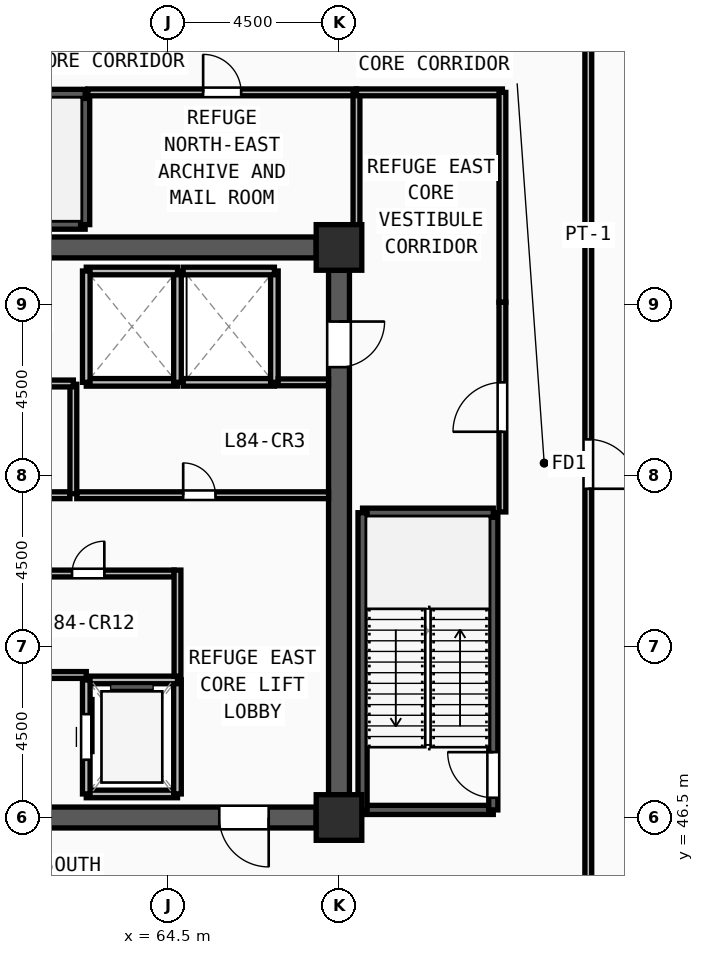
"""IFC4 building model, lengths in metres.
Left out: names, types, materials, properties, quantities, classifications, styles, units other than length and angle.
Written with IfcOpenShell. Run it as: python <this file> out.ifc"""

import sys

from ifc_helpers import new_model, si_unit, direction, frame, frame_2d, origin, origin_2d, place, context, subcontext, project, spatial, rectangle, extrude, source, transform, mapped, element, fill, save


model = new_model("IFC4")
c1 = context("Model", 3, precision=1e-05, world=origin(), true_north=direction((0.0, 1.0)))
c2 = subcontext(c1, "Body", "Model", "MODEL_VIEW")
j1 = project(units=[si_unit("LENGTHUNIT", "METRE"), si_unit("PLANEANGLEUNIT", "RADIAN")], contexts=[c1])
p1 = place(None, origin())
s1 = spatial("IfcSite", under=j1, at=p1, CompositionType="ELEMENT")
p2 = place(p1, origin())
s2 = spatial("IfcBuilding", under=s1, at=p2, CompositionType="ELEMENT")
p3 = place(p2, frame((0.0, 0.0, 324.0)))
s3 = spatial("IfcBuildingStorey", under=s2, at=p3, CompositionType="ELEMENT", Elevation=324.0)
m1 = source(origin(), c2, "Body", "SweptSolid", [
    extrude(rectangle(XDim=1.2, YDim=1.2, at=origin_2d()), origin(), (0.0, 0.0, 1.0), 4.5),
])
for number, where, z_axis, x_axis in (
    (1, (69.0, 46.5, 0.0), (0.0, 0.0, 1.0), (1.0, 0.0, 0.0)),
    (2, (69.0, 61.5, 0.0), (0.0, 0.0, 1.0), (1.0, 0.0, 0.0)),
):
    element("IfcColumn", number, at=place(p3, frame(where, z_axis=z_axis, x_axis=x_axis)), inside=s3, PredefinedType="COLUMN", context=c2, shape_type="MappedRepresentation", body=[
        mapped(m1, transform((0.0, 0.0, 0.0), x_axis=(1.0, 0.0, 0.0), y_axis=(0.0, 1.0, 0.0), z_axis=(0.0, 0.0, 1.0), scale=1.0)),
    ])
p4 = place(p3, frame((60.6, 61.5, 0.0), z_axis=(0.0, 0.0, 1.0), x_axis=(1.0, 0.0, 0.0)))
e3 = element("IfcWall", 3, at=p4, inside=s3, PredefinedType="SHEAR", context=c2, shape_type="SweptSolid", body=[
    extrude(rectangle(XDim=7.8, YDim=0.55, at=frame_2d((3.9, 0.0))), origin(), (0.0, 0.0, 1.0), 4.32),
])
p5 = place(p3, frame((69.0, 60.9, 0.0), z_axis=(0.0, 0.0, 1.0), x_axis=(0.0, -1.0, 0.0)))
e4 = element("IfcWall", 4, at=p5, inside=s3, PredefinedType="SHEAR", context=c2, shape_type="SweptSolid", body=[
    extrude(rectangle(XDim=13.8, YDim=0.55, at=frame_2d((6.9, 0.0))), origin(), (0.0, 0.0, 1.0), 4.32),
])
m2 = source(origin(), c2, "Body", "SweptSolid", [
    extrude(rectangle(XDim=1.2, YDim=2.2, at=frame_2d((0.6, 1.1))), frame((0.0, 0.285, 0.0), z_axis=(0.0, -1.0, 0.0), x_axis=(1.0, 0.0, 0.0)), (0.0, 0.0, 1.0), 0.57),
])
p6 = place(p5, frame((1.35, 0.0, 0.0)))
e5 = element("IfcOpeningElement", 5, at=p6, cuts=e4, PredefinedType="OPENING", context=c2, shape_type="MappedRepresentation", body=[
    mapped(m2, transform((0.0, 0.0, 0.0), x_axis=(1.0, 0.0, 0.0), y_axis=(0.0, 1.0, 0.0), z_axis=(0.0, 0.0, 1.0), scale=1.0)),
])
p7 = place(p3, frame((68.4, 46.5, 0.0), z_axis=(0.0, 0.0, 1.0), x_axis=(-1.0, 0.0, 0.0)))
e6 = element("IfcWall", 6, at=p7, inside=s3, PredefinedType="SHEAR", context=c2, shape_type="SweptSolid", body=[
    extrude(rectangle(XDim=7.8, YDim=0.55, at=frame_2d((3.9, 0.0))), origin(), (0.0, 0.0, 1.0), 4.32),
])
m3 = source(origin(), c2, "Body", "SweptSolid", [
    extrude(rectangle(XDim=1.3, YDim=2.2, at=frame_2d((0.65, 1.1))), frame((0.0, 0.285, 0.0), z_axis=(0.0, -1.0, 0.0), x_axis=(1.0, 0.0, 0.0)), (0.0, 0.0, 1.0), 0.57),
])
p8 = place(p7, frame((1.25, 0.0, 0.0)))
e7 = element("IfcOpeningElement", 7, at=p8, cuts=e6, PredefinedType="OPENING", context=c2, shape_type="MappedRepresentation", body=[
    mapped(m3, transform((0.0, 0.0, 0.0), x_axis=(1.0, 0.0, 0.0), y_axis=(0.0, 1.0, 0.0), z_axis=(0.0, 0.0, 1.0), scale=1.0)),
])
p9 = place(p3, frame((69.62, 46.7, 0.0), z_axis=(0.0, 0.0, 1.0), x_axis=(1.0, 0.0, 0.0)))
e8 = element("IfcWall", 8, at=p9, inside=s3, PredefinedType="SOLIDWALL", context=c2, shape_type="SweptSolid", body=[
    extrude(rectangle(XDim=3.44, YDim=0.24, at=frame_2d((1.72, 0.0))), origin(), (0.0, 0.0, 1.0), 4.32),
])
p10 = place(p3, frame((73.06, 46.7, 0.0), z_axis=(0.0, 0.0, 1.0), x_axis=(0.0, 1.0, 0.0)))
e9 = element("IfcWall", 9, at=p10, inside=s3, PredefinedType="SOLIDWALL", context=c2, shape_type="SweptSolid", body=[
    extrude(rectangle(XDim=7.82, YDim=0.24, at=frame_2d((3.91, 0.0))), origin(), (0.0, 0.0, 1.0), 4.32),
])
m4 = source(origin(), c2, "Body", "SweptSolid", [
    extrude(rectangle(XDim=1.2, YDim=2.2, at=frame_2d((0.6, 1.1))), frame((0.0, 0.13, 0.0), z_axis=(0.0, -1.0, 0.0), x_axis=(1.0, 0.0, 0.0)), (0.0, 0.0, 1.0), 0.26),
])
p11 = place(p10, frame((0.32, 0.0, 0.0)))
e10 = element("IfcOpeningElement", 10, at=p11, cuts=e9, PredefinedType="OPENING", context=c2, shape_type="MappedRepresentation", body=[
    mapped(m4, transform((0.0, 0.0, 0.0), x_axis=(1.0, 0.0, 0.0), y_axis=(0.0, 1.0, 0.0), z_axis=(0.0, 0.0, 1.0), scale=1.0)),
])
p12 = place(p3, frame((73.06, 54.52, 0.0), z_axis=(0.0, 0.0, 1.0), x_axis=(-1.0, 0.0, 0.0)))
e11 = element("IfcWall", 11, at=p12, inside=s3, PredefinedType="SOLIDWALL", context=c2, shape_type="SweptSolid", body=[
    extrude(rectangle(XDim=3.44, YDim=0.24, at=frame_2d((1.72, 0.0))), origin(), (0.0, 0.0, 1.0), 4.32),
])
for number, where, z_axis, x_axis in (
    (12, (69.62, 54.52, 0.0), (0.0, 0.0, 1.0), (0.0, -1.0, 0.0)),
    (13, (54.5, 62.1, 0.0), (0.0, 0.0, 1.0), (1.0, 0.0, 0.0)),
):
    element("IfcWall", number, at=place(p3, frame(where, z_axis=z_axis, x_axis=x_axis)), inside=s3, PredefinedType="SOLIDWALL", context=c2, shape_type="SweptSolid", body=[
        extrude(rectangle(XDim=7.82, YDim=0.24, at=frame_2d((3.91, 0.0))), origin(), (0.0, 0.0, 1.0), 4.32),
    ])
p13 = place(p3, frame((62.32, 62.1, 0.0), z_axis=(0.0, 0.0, 1.0), x_axis=(0.0, 1.0, 0.0)))
e14 = element("IfcWall", 14, at=p13, inside=s3, PredefinedType="SOLIDWALL", context=c2, shape_type="SweptSolid", body=[
    extrude(rectangle(XDim=3.44, YDim=0.24, at=frame_2d((1.72, 0.0))), origin(), (0.0, 0.0, 1.0), 4.32),
])
p14 = place(p3, frame((62.32, 65.54, 0.0), z_axis=(0.0, 0.0, 1.0), x_axis=(-1.0, 0.0, 0.0)))
e15 = element("IfcWall", 15, at=p14, inside=s3, PredefinedType="SOLIDWALL", context=c2, shape_type="SweptSolid", body=[
    extrude(rectangle(XDim=7.82, YDim=0.24, at=frame_2d((3.91, 0.0))), origin(), (0.0, 0.0, 1.0), 4.32),
])
p15 = place(p14, frame((6.3, 0.0, 0.0)))
e16 = element("IfcOpeningElement", 16, at=p15, cuts=e15, PredefinedType="OPENING", context=c2, shape_type="MappedRepresentation", body=[
    mapped(m4, transform((0.0, 0.0, 0.0), x_axis=(1.0, 0.0, 0.0), y_axis=(0.0, 1.0, 0.0), z_axis=(0.0, 0.0, 1.0), scale=1.0)),
])
p16 = place(p3, frame((62.35, 47.12, 0.0), z_axis=(0.0, 0.0, 1.0), x_axis=(1.0, 0.0, 0.0)))
e17 = element("IfcWall", 17, at=p16, inside=s3, PredefinedType="SOLIDWALL", context=c2, shape_type="SweptSolid", body=[
    extrude(rectangle(XDim=2.4, YDim=0.2, at=frame_2d((1.2, 0.0))), origin(), (0.0, 0.0, 1.0), 4.32),
])
p17 = place(p3, frame((64.75, 47.12, 0.0), z_axis=(0.0, 0.0, 1.0), x_axis=(0.0, 1.0, 0.0)))
e18 = element("IfcWall", 18, at=p17, inside=s3, PredefinedType="SOLIDWALL", context=c2, shape_type="SweptSolid", body=[
    extrude(rectangle(XDim=3.0, YDim=0.2, at=frame_2d((1.5, 0.0))), origin(), (0.0, 0.0, 1.0), 4.32),
])
p18 = place(p3, frame((64.75, 50.12, 0.0), z_axis=(0.0, 0.0, 1.0), x_axis=(-1.0, 0.0, 0.0)))
e19 = element("IfcWall", 19, at=p18, inside=s3, PredefinedType="SOLIDWALL", context=c2, shape_type="SweptSolid", body=[
    extrude(rectangle(XDim=2.4, YDim=0.2, at=frame_2d((1.2, 0.0))), origin(), (0.0, 0.0, 1.0), 4.32),
])
p19 = place(p3, frame((62.35, 50.12, 0.0), z_axis=(0.0, 0.0, 1.0), x_axis=(0.0, -1.0, 0.0)))
e20 = element("IfcWall", 20, at=p19, inside=s3, PredefinedType="SOLIDWALL", context=c2, shape_type="SweptSolid", body=[
    extrude(rectangle(XDim=3.0, YDim=0.2, at=frame_2d((1.5, 0.0))), origin(), (0.0, 0.0, 1.0), 4.32),
])
m5 = source(origin(), c2, "Body", "SweptSolid", [
    extrude(rectangle(XDim=1.2, YDim=2.3, at=frame_2d((0.6, 1.15))), frame((0.0, 0.11, 0.0), z_axis=(0.0, -1.0, 0.0), x_axis=(1.0, 0.0, 0.0)), (0.0, 0.0, 1.0), 0.22),
])
p20 = place(p19, frame((0.9, 0.0, 0.0)))
e21 = element("IfcOpeningElement", 21, at=p20, cuts=e20, PredefinedType="OPENING", context=c2, shape_type="MappedRepresentation", body=[
    mapped(m5, transform((0.0, 0.0, 0.0), x_axis=(1.0, 0.0, 0.0), y_axis=(0.0, 1.0, 0.0), z_axis=(0.0, 0.0, 1.0), scale=1.0)),
])
p21 = place(p3, frame((62.35, 57.95, 0.0), z_axis=(0.0, 0.0, 1.0), x_axis=(1.0, 0.0, 0.0)))
e22 = element("IfcWall", 22, at=p21, inside=s3, PredefinedType="SOLIDWALL", context=c2, shape_type="SweptSolid", body=[
    extrude(rectangle(XDim=2.4, YDim=0.2, at=frame_2d((1.2, 0.0))), origin(), (0.0, 0.0, 1.0), 4.32),
])
p22 = place(p3, frame((64.75, 57.95, 0.0), z_axis=(0.0, 0.0, 1.0), x_axis=(0.0, 1.0, 0.0)))
e23 = element("IfcWall", 23, at=p22, inside=s3, PredefinedType="SOLIDWALL", context=c2, shape_type="SweptSolid", body=[
    extrude(rectangle(XDim=2.93, YDim=0.2, at=frame_2d((1.465, 0.0))), origin(), (0.0, 0.0, 1.0), 4.32),
])
p23 = place(p3, frame((64.75, 60.88, 0.0), z_axis=(0.0, 0.0, 1.0), x_axis=(-1.0, 0.0, 0.0)))
e24 = element("IfcWall", 24, at=p23, inside=s3, PredefinedType="SOLIDWALL", context=c2, shape_type="SweptSolid", body=[
    extrude(rectangle(XDim=2.4, YDim=0.2, at=frame_2d((1.2, 0.0))), origin(), (0.0, 0.0, 1.0), 4.32),
])
p24 = place(p3, frame((62.35, 60.88, 0.0), z_axis=(0.0, 0.0, 1.0), x_axis=(0.0, -1.0, 0.0)))
e25 = element("IfcWall", 25, at=p24, inside=s3, PredefinedType="SOLIDWALL", context=c2, shape_type="SweptSolid", body=[
    extrude(rectangle(XDim=2.93, YDim=0.2, at=frame_2d((1.465, 0.0))), origin(), (0.0, 0.0, 1.0), 4.32),
])
p25 = place(p3, frame((64.9, 57.95, 0.0), z_axis=(0.0, 0.0, 1.0), x_axis=(1.0, 0.0, 0.0)))
e26 = element("IfcWall", 26, at=p25, inside=s3, PredefinedType="SOLIDWALL", context=c2, shape_type="SweptSolid", body=[
    extrude(rectangle(XDim=2.4, YDim=0.2, at=frame_2d((1.2, 0.0))), origin(), (0.0, 0.0, 1.0), 4.32),
])
p26 = place(p3, frame((67.3, 57.95, 0.0), z_axis=(0.0, 0.0, 1.0), x_axis=(0.0, 1.0, 0.0)))
e27 = element("IfcWall", 27, at=p26, inside=s3, PredefinedType="SOLIDWALL", context=c2, shape_type="SweptSolid", body=[
    extrude(rectangle(XDim=2.93, YDim=0.2, at=frame_2d((1.465, 0.0))), origin(), (0.0, 0.0, 1.0), 4.32),
])
p27 = place(p3, frame((67.3, 60.88, 0.0), z_axis=(0.0, 0.0, 1.0), x_axis=(-1.0, 0.0, 0.0)))
e28 = element("IfcWall", 28, at=p27, inside=s3, PredefinedType="SOLIDWALL", context=c2, shape_type="SweptSolid", body=[
    extrude(rectangle(XDim=2.4, YDim=0.2, at=frame_2d((1.2, 0.0))), origin(), (0.0, 0.0, 1.0), 4.32),
])
p28 = place(p3, frame((60.0, 52.92, 0.0), z_axis=(0.0, 0.0, 1.0), x_axis=(1.0, 0.0, 0.0)))
e29 = element("IfcWall", 29, at=p28, inside=s3, PredefinedType="PARTITIONING", context=c2, shape_type="SweptSolid", body=[
    extrude(rectangle(XDim=4.66, YDim=0.18, at=frame_2d((2.33, 0.0))), origin(), (0.0, 0.0, 1.0), 4.32),
])
m6 = source(origin(), c2, "Body", "SweptSolid", [
    extrude(rectangle(XDim=0.85, YDim=2.1, at=frame_2d((0.425, 1.05))), frame((0.0, 0.1, 0.0), z_axis=(0.0, -1.0, 0.0), x_axis=(1.0, 0.0, 0.0)), (0.0, 0.0, 1.0), 0.2),
])
p29 = place(p28, frame((1.975, 0.0, 0.0)))
e30 = element("IfcOpeningElement", 30, at=p29, cuts=e29, PredefinedType="OPENING", context=c2, shape_type="MappedRepresentation", body=[
    mapped(m6, transform((0.0, 0.0, 0.0), x_axis=(1.0, 0.0, 0.0), y_axis=(0.0, 1.0, 0.0), z_axis=(0.0, 0.0, 1.0), scale=1.0)),
])
p30 = place(p3, frame((62.1, 54.98, 0.0), z_axis=(0.0, 0.0, 1.0), x_axis=(1.0, 0.0, 0.0)))
e31 = element("IfcWall", 31, at=p30, inside=s3, PredefinedType="PARTITIONING", context=c2, shape_type="SweptSolid", body=[
    extrude(rectangle(XDim=6.625, YDim=0.18, at=frame_2d((3.312, 0.0))), origin(), (0.0, 0.0, 1.0), 4.32),
])
p31 = place(p30, frame((2.8, 0.0, 0.0)))
e32 = element("IfcOpeningElement", 32, at=p31, cuts=e31, PredefinedType="OPENING", context=c2, shape_type="MappedRepresentation", body=[
    mapped(m6, transform((0.0, 0.0, 0.0), x_axis=(1.0, 0.0, 0.0), y_axis=(0.0, 1.0, 0.0), z_axis=(0.0, 0.0, 1.0), scale=1.0)),
])
p32 = place(p3, frame((59.81, 54.98, 0.0), z_axis=(0.0, 0.0, 1.0), x_axis=(1.0, 0.0, 0.0)))
e33 = element("IfcWall", 33, at=p32, inside=s3, PredefinedType="PARTITIONING", context=c2, shape_type="SweptSolid", body=[
    extrude(rectangle(XDim=2.11, YDim=0.18, at=frame_2d((1.055, 0.0))), origin(), (0.0, 0.0, 1.0), 4.32),
])
p33 = place(p32, frame((0.635, 0.0, 0.0)))
e34 = element("IfcOpeningElement", 34, at=p33, cuts=e33, PredefinedType="OPENING", context=c2, shape_type="MappedRepresentation", body=[
    mapped(m6, transform((0.0, 0.0, 0.0), x_axis=(1.0, 0.0, 0.0), y_axis=(0.0, 1.0, 0.0), z_axis=(0.0, 0.0, 1.0), scale=1.0)),
])
p34 = place(p3, frame((62.39, 65.58, 0.0), z_axis=(0.0, 0.0, 1.0), x_axis=(1.0, 0.0, 0.0)))
e35 = element("IfcWall", 35, at=p34, inside=s3, PredefinedType="PARTITIONING", context=c2, shape_type="SweptSolid", body=[
    extrude(rectangle(XDim=7.07, YDim=0.18, at=frame_2d((3.535, 0.0))), origin(), (0.0, 0.0, 1.0), 4.32),
])
m7 = source(origin(), c2, "Body", "SweptSolid", [
    extrude(rectangle(XDim=1.0, YDim=2.2, at=frame_2d((0.5, 1.1))), frame((0.0, 0.1, 0.0), z_axis=(0.0, -1.0, 0.0), x_axis=(1.0, 0.0, 0.0)), (0.0, 0.0, 1.0), 0.2),
])
p35 = place(p34, frame((3.035, 0.0, 0.0)))
e36 = element("IfcOpeningElement", 36, at=p35, cuts=e35, PredefinedType="OPENING", context=c2, shape_type="MappedRepresentation", body=[
    mapped(m7, transform((0.0, 0.0, 0.0), x_axis=(1.0, 0.0, 0.0), y_axis=(0.0, 1.0, 0.0), z_axis=(0.0, 0.0, 1.0), scale=1.0)),
])
p36 = place(p3, frame((73.3, 54.54, 0.0), z_axis=(0.0, 0.0, 1.0), x_axis=(0.0, 1.0, 0.0)))
e37 = element("IfcWall", 37, at=p36, inside=s3, PredefinedType="PARTITIONING", context=c2, shape_type="SweptSolid", body=[
    extrude(rectangle(XDim=5.52, YDim=0.18, at=frame_2d((2.76, 0.0))), origin(), (0.0, 0.0, 1.0), 4.32),
])
m8 = source(origin(), c2, "Body", "SweptSolid", [
    extrude(rectangle(XDim=1.3, YDim=2.2, at=frame_2d((0.65, 1.1))), frame((0.0, 0.1, 0.0), z_axis=(0.0, -1.0, 0.0), x_axis=(1.0, 0.0, 0.0)), (0.0, 0.0, 1.0), 0.2),
])
p37 = place(p36, frame((2.11, 0.0, 0.0)))
e38 = element("IfcOpeningElement", 38, at=p37, cuts=e37, PredefinedType="OPENING", context=c2, shape_type="MappedRepresentation", body=[
    mapped(m8, transform((0.0, 0.0, 0.0), x_axis=(1.0, 0.0, 0.0), y_axis=(0.0, 1.0, 0.0), z_axis=(0.0, 0.0, 1.0), scale=1.0)),
])
p38 = place(p3, frame((75.56, 67.015, 0.0), z_axis=(0.0, 0.0, 1.0), x_axis=(0.0, -1.0, 0.0)))
e39 = element("IfcWall", 39, at=p38, inside=s3, PredefinedType="PARTITIONING", context=c2, shape_type="SweptSolid", body=[
    extrude(rectangle(XDim=22.43, YDim=0.18, at=frame_2d((11.215, 0.0))), origin(), (0.0, 0.0, 1.0), 4.32),
])
p39 = place(p38, frame((10.565, 0.0, 0.0)))
e40 = element("IfcOpeningElement", 40, at=p39, cuts=e39, PredefinedType="OPENING", context=c2, shape_type="MappedRepresentation", body=[
    mapped(m8, transform((0.0, 0.0, 0.0), x_axis=(1.0, 0.0, 0.0), y_axis=(0.0, 1.0, 0.0), z_axis=(0.0, 0.0, 1.0), scale=1.0)),
])
p40 = place(p3, frame((62.01, 55.02, 0.0), z_axis=(0.0, 0.0, 1.0), x_axis=(0.0, 1.0, 0.0)))
e41 = element("IfcWall", 41, at=p40, inside=s3, PredefinedType="PARTITIONING", context=c2, shape_type="SweptSolid", body=[
    extrude(rectangle(XDim=2.88, YDim=0.18, at=frame_2d((1.44, 0.0))), origin(), (0.0, 0.0, 1.0), 4.32),
])
p41 = place(p3, frame((59.72, 57.92, 0.0), z_axis=(0.0, 0.0, 1.0), x_axis=(1.0, 0.0, 0.0)))
e42 = element("IfcWall", 42, at=p41, inside=s3, PredefinedType="PARTITIONING", context=c2, shape_type="SweptSolid", body=[
    extrude(rectangle(XDim=2.29, YDim=0.18, at=frame_2d((1.145, 0.0))), origin(), (0.0, 0.0, 1.0), 4.32),
])
p42 = place(p3, frame((69.46, 61.95, 0.0), z_axis=(0.0, 0.0, 1.0), x_axis=(0.0, 1.0, 0.0)))
e43 = element("IfcWall", 43, at=p42, inside=s3, PredefinedType="PARTITIONING", context=c2, shape_type="SweptSolid", body=[
    extrude(rectangle(XDim=3.63, YDim=0.18, at=frame_2d((1.815, 0.0))), origin(), (0.0, 0.0, 1.0), 4.32),
])
p43 = place(p3, frame((69.46, 65.58, 0.0), z_axis=(0.0, 0.0, 1.0), x_axis=(1.0, 0.0, 0.0)))
e44 = element("IfcWall", 44, at=p43, inside=s3, PredefinedType="PARTITIONING", context=c2, shape_type="SweptSolid", body=[
    extrude(rectangle(XDim=3.84, YDim=0.18, at=frame_2d((1.92, 0.0))), origin(), (0.0, 0.0, 1.0), 4.32),
])
p44 = place(p3, frame((73.3, 60.06, 0.0), z_axis=(0.0, 0.0, 1.0), x_axis=(0.0, 1.0, 0.0)))
e45 = element("IfcWall", 45, at=p44, inside=s3, PredefinedType="PARTITIONING", context=c2, shape_type="SweptSolid", body=[
    extrude(rectangle(XDim=5.52, YDim=0.18, at=frame_2d((2.76, 0.0))), origin(), (0.0, 0.0, 1.0), 4.32),
])
p45 = place(p3, frame((64.75, 50.22, 0.0), z_axis=(0.0, 0.0, 1.0), x_axis=(0.0, 1.0, 0.0)))
e46 = element("IfcWall", 46, at=p45, inside=s3, PredefinedType="PARTITIONING", context=c2, shape_type="SweptSolid", body=[
    extrude(rectangle(XDim=2.79, YDim=0.18, at=frame_2d((1.395, 0.0))), origin(), (0.0, 0.0, 1.0), 4.32),
])
p46 = place(p3, frame((60.0, 50.25, 0.0), z_axis=(0.0, 0.0, 1.0), x_axis=(1.0, 0.0, 0.0)))
e47 = element("IfcWall", 47, at=p46, inside=s3, PredefinedType="PARTITIONING", context=c2, shape_type="SweptSolid", body=[
    extrude(rectangle(XDim=2.35, YDim=0.18, at=frame_2d((1.175, 0.0))), origin(), (0.0, 0.0, 1.0), 4.32),
])
p47 = place(p3, frame((67.4, 57.95, 0.0), z_axis=(0.0, 0.0, 1.0), x_axis=(1.0, 0.0, 0.0)))
e48 = element("IfcWall", 48, at=p47, inside=s3, PredefinedType="PARTITIONING", context=c2, shape_type="SweptSolid", body=[
    extrude(rectangle(XDim=1.325, YDim=0.18, at=frame_2d((0.663, 0.0))), origin(), (0.0, 0.0, 1.0), 4.32),
])
m9 = source(origin(), c2, "Body", "SweptSolid", [
    extrude(rectangle(XDim=1.3, YDim=2.2, at=frame_2d((0.65, 1.1))), frame((0.0, 0.025, 0.0), z_axis=(0.0, -1.0, 0.0), x_axis=(1.0, 0.0, 0.0)), (0.0, 0.0, 1.0), 0.05),
])
p48 = place(p8, origin())
e49 = element("IfcDoor", 49, at=p48, inside=s3, OperationType="SINGLE_SWING_LEFT", PredefinedType="DOOR", context=c2, shape_type="MappedRepresentation", body=[
    mapped(m9, transform((0.0, 0.0, 0.0), x_axis=(1.0, 0.0, 0.0), y_axis=(0.0, 1.0, 0.0), z_axis=(0.0, 0.0, 1.0), scale=1.0)),
])
fill(e7, e49)
m10 = source(origin(), c2, "Body", "SweptSolid", [
    extrude(rectangle(XDim=1.2, YDim=2.2, at=frame_2d((0.6, 1.1))), frame((0.0, 0.025, 0.0), z_axis=(0.0, -1.0, 0.0), x_axis=(1.0, 0.0, 0.0)), (0.0, 0.0, 1.0), 0.05),
])
p49 = place(p6, origin())
e50 = element("IfcDoor", 50, at=p49, inside=s3, OperationType="SINGLE_SWING_LEFT", PredefinedType="DOOR", context=c2, shape_type="MappedRepresentation", body=[
    mapped(m10, transform((0.0, 0.0, 0.0), x_axis=(1.0, 0.0, 0.0), y_axis=(0.0, 1.0, 0.0), z_axis=(0.0, 0.0, 1.0), scale=1.0)),
])
fill(e5, e50)
p50 = place(p11, origin())
e51 = element("IfcDoor", 51, at=p50, inside=s3, OperationType="SINGLE_SWING_RIGHT", PredefinedType="DOOR", context=c2, shape_type="MappedRepresentation", body=[
    mapped(m10, transform((0.0, 0.0, 0.0), x_axis=(1.0, 0.0, 0.0), y_axis=(0.0, 1.0, 0.0), z_axis=(0.0, 0.0, 1.0), scale=1.0)),
])
fill(e10, e51)
m11 = source(origin(), c2, "Body", "SweptSolid", [
    extrude(rectangle(XDim=1.2, YDim=2.3, at=frame_2d((0.6, 1.15))), frame((0.0, 0.025, 0.0), z_axis=(0.0, -1.0, 0.0), x_axis=(1.0, 0.0, 0.0)), (0.0, 0.0, 1.0), 0.05),
])
p51 = place(p20, origin())
e52 = element("IfcDoor", 52, at=p51, inside=s3, OperationType="SLIDING_TO_LEFT", PredefinedType="DOOR", context=c2, shape_type="MappedRepresentation", body=[
    mapped(m11, transform((0.0, 0.0, 0.0), x_axis=(1.0, 0.0, 0.0), y_axis=(0.0, 1.0, 0.0), z_axis=(0.0, 0.0, 1.0), scale=1.0)),
])
fill(e21, e52)
m12 = source(origin(), c2, "Body", "SweptSolid", [
    extrude(rectangle(XDim=0.85, YDim=2.1, at=frame_2d((0.425, 1.05))), frame((0.0, 0.025, 0.0), z_axis=(0.0, -1.0, 0.0), x_axis=(1.0, 0.0, 0.0)), (0.0, 0.0, 1.0), 0.05),
])
p52 = place(p29, origin())
e53 = element("IfcDoor", 53, at=p52, inside=s3, OperationType="SINGLE_SWING_RIGHT", PredefinedType="DOOR", context=c2, shape_type="MappedRepresentation", body=[
    mapped(m12, transform((0.0, 0.0, 0.0), x_axis=(1.0, 0.0, 0.0), y_axis=(0.0, 1.0, 0.0), z_axis=(0.0, 0.0, 1.0), scale=1.0)),
])
fill(e30, e53)
p53 = place(p31, origin())
e54 = element("IfcDoor", 54, at=p53, inside=s3, OperationType="SINGLE_SWING_LEFT", PredefinedType="DOOR", context=c2, shape_type="MappedRepresentation", body=[
    mapped(m12, transform((0.0, 0.0, 0.0), x_axis=(1.0, 0.0, 0.0), y_axis=(0.0, 1.0, 0.0), z_axis=(0.0, 0.0, 1.0), scale=1.0)),
])
fill(e32, e54)
m13 = source(origin(), c2, "Body", "SweptSolid", [
    extrude(rectangle(XDim=1.0, YDim=2.2, at=frame_2d((0.5, 1.1))), frame((0.0, 0.025, 0.0), z_axis=(0.0, -1.0, 0.0), x_axis=(1.0, 0.0, 0.0)), (0.0, 0.0, 1.0), 0.05),
])
p54 = place(p35, origin())
e55 = element("IfcDoor", 55, at=p54, inside=s3, OperationType="SINGLE_SWING_LEFT", PredefinedType="DOOR", context=c2, shape_type="MappedRepresentation", body=[
    mapped(m13, transform((0.0, 0.0, 0.0), x_axis=(1.0, 0.0, 0.0), y_axis=(0.0, 1.0, 0.0), z_axis=(0.0, 0.0, 1.0), scale=1.0)),
])
fill(e36, e55)
p55 = place(p37, origin())
e56 = element("IfcDoor", 56, at=p55, inside=s3, OperationType="SINGLE_SWING_LEFT", PredefinedType="DOOR", context=c2, shape_type="MappedRepresentation", body=[
    mapped(m9, transform((0.0, 0.0, 0.0), x_axis=(1.0, 0.0, 0.0), y_axis=(0.0, 1.0, 0.0), z_axis=(0.0, 0.0, 1.0), scale=1.0)),
])
fill(e38, e56)
p56 = place(p39, origin())
e57 = element("IfcDoor", 57, at=p56, inside=s3, OperationType="SINGLE_SWING_RIGHT", PredefinedType="DOOR", context=c2, shape_type="MappedRepresentation", body=[
    mapped(m9, transform((0.0, 0.0, 0.0), x_axis=(1.0, 0.0, 0.0), y_axis=(0.0, 1.0, 0.0), z_axis=(0.0, 0.0, 1.0), scale=1.0)),
])
fill(e40, e57)
save(model, sys.argv[1])
